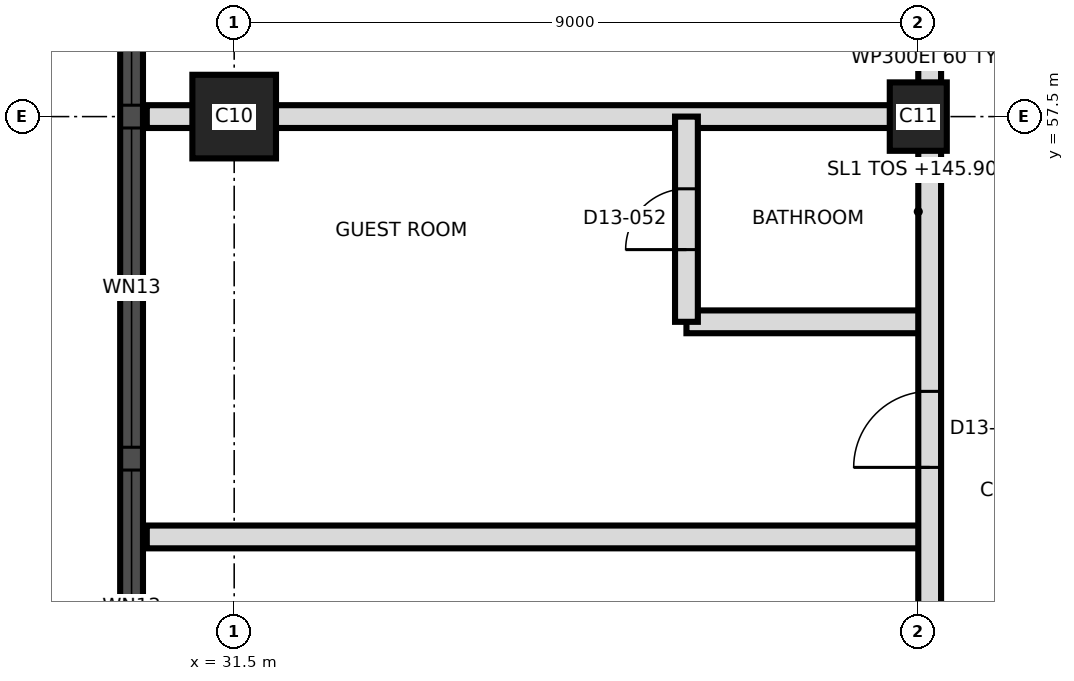
"""IFC4 building model, lengths in metres.
Left out: names, types, materials, properties, quantities, classifications, styles, units other than length and angle.
Written with IfcOpenShell. Run it as: python <this file> out.ifc"""

import sys

from ifc_helpers import new_model, si_unit, direction, frame, frame_2d, origin, origin_2d, place, context, subcontext, project, spatial, rectangle, extrude, element, fill, save


model = new_model("IFC4")
c1 = context("Model", 3, precision=1e-05, world=origin(), true_north=direction((0.0, 1.0)))
c2 = subcontext(c1, "Body", "Model", "MODEL_VIEW")
j1 = project(units=[si_unit("LENGTHUNIT", "METRE"), si_unit("PLANEANGLEUNIT", "RADIAN")], contexts=[c1])
p1 = place(None, origin())
s1 = spatial("IfcSite", under=j1, at=p1, CompositionType="ELEMENT")
p2 = place(p1, origin())
s2 = spatial("IfcBuilding", under=s1, at=p2, CompositionType="ELEMENT")
p3 = place(p2, frame((0.0, 0.0, 145.9)))
s3 = spatial("IfcBuildingStorey", under=s2, at=p3, CompositionType="ELEMENT", Elevation=145.9)
p4 = place(p3, frame((31.5, 57.5, 0.0), z_axis=(0.0, 0.0, 1.0), x_axis=(1.0, 0.0, 0.0)))
e1 = element("IfcColumn", 1, at=p4, inside=s3, PredefinedType="COLUMN", context=c2, shape_type="SweptSolid", body=[
    extrude(rectangle(XDim=1.1, YDim=1.1, at=origin_2d()), origin(), (0.0, 0.0, 1.0), 3.7),
])
p5 = place(p3, frame((40.5, 57.5, 0.0), z_axis=(0.0, 0.0, 1.0), x_axis=(0.0, 1.0, 0.0)))
e2 = element("IfcColumn", 2, at=p5, inside=s3, PredefinedType="COLUMN", context=c2, shape_type="SweptSolid", body=[
    extrude(rectangle(XDim=0.9, YDim=0.75, at=origin_2d()), origin(), (0.0, 0.0, 1.0), 3.7),
])
p6 = place(p3, frame((30.15, 66.992, 0.0), z_axis=(0.0, 0.0, 1.0), x_axis=(0.0, -1.0, 0.0)))
e3 = element("IfcWall", 3, at=p6, inside=s3, PredefinedType="SOLIDWALL", context=c2, shape_type="SweptSolid", body=[
    extrude(rectangle(XDim=32.968, YDim=0.3, at=frame_2d((16.484, 0.0))), origin(), (0.0, 0.0, 1.0), 3.4),
])
p7 = place(p6, frame((1.596, 0.0, 0.3)))
e4 = element("IfcOpeningElement", 4, at=p7, cuts=e3, PredefinedType="OPENING", context=c2, shape_type="SweptSolid", body=[
    extrude(rectangle(XDim=1.8, YDim=2.4, at=frame_2d((0.9, 1.2))), frame((0.0, 0.16, 0.0), z_axis=(0.0, -1.0, 0.0), x_axis=(1.0, 0.0, 0.0)), (0.0, 0.0, 1.0), 0.32),
])
p8 = place(p6, frame((5.142, 0.0, 0.9)))
e5 = element("IfcOpeningElement", 5, at=p8, cuts=e3, PredefinedType="OPENING", context=c2, shape_type="SweptSolid", body=[
    extrude(rectangle(XDim=4.2, YDim=1.7, at=frame_2d((2.1, 0.85))), frame((0.0, 0.16, 0.0), z_axis=(0.0, -1.0, 0.0), x_axis=(1.0, 0.0, 0.0)), (0.0, 0.0, 1.0), 0.32),
])
p9 = place(p6, frame((9.642, 0.0, 0.9)))
e6 = element("IfcOpeningElement", 6, at=p9, cuts=e3, PredefinedType="OPENING", context=c2, shape_type="SweptSolid", body=[
    extrude(rectangle(XDim=4.2, YDim=1.7, at=frame_2d((2.1, 0.85))), frame((0.0, 0.16, 0.0), z_axis=(0.0, -1.0, 0.0), x_axis=(1.0, 0.0, 0.0)), (0.0, 0.0, 1.0), 0.32),
])
p10 = place(p6, frame((14.142, 0.0, 0.9)))
e7 = element("IfcOpeningElement", 7, at=p10, cuts=e3, PredefinedType="OPENING", context=c2, shape_type="SweptSolid", body=[
    extrude(rectangle(XDim=4.2, YDim=1.7, at=frame_2d((2.1, 0.85))), frame((0.0, 0.16, 0.0), z_axis=(0.0, -1.0, 0.0), x_axis=(1.0, 0.0, 0.0)), (0.0, 0.0, 1.0), 0.32),
])
p11 = place(p6, frame((18.642, 0.0, 0.9)))
e8 = element("IfcOpeningElement", 8, at=p11, cuts=e3, PredefinedType="OPENING", context=c2, shape_type="SweptSolid", body=[
    extrude(rectangle(XDim=4.2, YDim=1.7, at=frame_2d((2.1, 0.85))), frame((0.0, 0.16, 0.0), z_axis=(0.0, -1.0, 0.0), x_axis=(1.0, 0.0, 0.0)), (0.0, 0.0, 1.0), 0.32),
])
p12 = place(p6, frame((23.142, 0.0, 0.9)))
e9 = element("IfcOpeningElement", 9, at=p12, cuts=e3, PredefinedType="OPENING", context=c2, shape_type="SweptSolid", body=[
    extrude(rectangle(XDim=4.2, YDim=1.7, at=frame_2d((2.1, 0.85))), frame((0.0, 0.16, 0.0), z_axis=(0.0, -1.0, 0.0), x_axis=(1.0, 0.0, 0.0)), (0.0, 0.0, 1.0), 0.32),
])
p13 = place(p6, frame((29.33, 0.0, 0.3)))
e10 = element("IfcOpeningElement", 10, at=p13, cuts=e3, PredefinedType="OPENING", context=c2, shape_type="SweptSolid", body=[
    extrude(rectangle(XDim=1.8, YDim=2.4, at=frame_2d((0.9, 1.2))), frame((0.0, 0.16, 0.0), z_axis=(0.0, -1.0, 0.0), x_axis=(1.0, 0.0, 0.0)), (0.0, 0.0, 1.0), 0.32),
])
p14 = place(p3, frame((30.35, 51.97, 0.0), z_axis=(0.0, 0.0, 1.0), x_axis=(1.0, 0.0, 0.0)))
e11 = element("IfcWall", 11, at=p14, inside=s3, PredefinedType="PARTITIONING", context=c2, shape_type="SweptSolid", body=[
    extrude(rectangle(XDim=10.3, YDim=0.3, at=frame_2d((5.15, 0.0))), origin(), (0.0, 0.0, 1.0), 3.4),
])
p15 = place(p3, frame((37.45, 54.8, 0.0), z_axis=(0.0, 0.0, 1.0), x_axis=(1.0, 0.0, 0.0)))
e12 = element("IfcWall", 12, at=p15, inside=s3, PredefinedType="PARTITIONING", context=c2, shape_type="SweptSolid", body=[
    extrude(rectangle(XDim=3.2, YDim=0.3, at=frame_2d((1.6, 0.0))), origin(), (0.0, 0.0, 1.0), 3.4),
])
p16 = place(p3, frame((30.35, 57.5, 0.0), z_axis=(0.0, 0.0, 1.0), x_axis=(1.0, 0.0, 0.0)))
e13 = element("IfcWall", 13, at=p16, inside=s3, PredefinedType="PARTITIONING", context=c2, shape_type="SweptSolid", body=[
    extrude(rectangle(XDim=10.3, YDim=0.3, at=frame_2d((5.15, 0.0))), origin(), (0.0, 0.0, 1.0), 3.4),
])
p17 = place(p3, frame((37.45, 54.8, 0.0), z_axis=(0.0, 0.0, 1.0), x_axis=(0.0, 1.0, 0.0)))
e14 = element("IfcWall", 14, at=p17, inside=s3, PredefinedType="PARTITIONING", context=c2, shape_type="SweptSolid", body=[
    extrude(rectangle(XDim=2.7, YDim=0.3, at=frame_2d((1.35, 0.0))), origin(), (0.0, 0.0, 1.0), 3.4),
])
p18 = place(p17, frame((0.95, 0.0, 0.0)))
e15 = element("IfcOpeningElement", 15, at=p18, cuts=e14, PredefinedType="OPENING", context=c2, shape_type="SweptSolid", body=[
    extrude(rectangle(XDim=0.8, YDim=2.1, at=frame_2d((0.4, 1.05))), frame((0.0, 0.16, 0.0), z_axis=(0.0, -1.0, 0.0), x_axis=(1.0, 0.0, 0.0)), (0.0, 0.0, 1.0), 0.32),
])
p19 = place(p3, frame((40.65, 39.65, 0.0), z_axis=(0.0, 0.0, 1.0), x_axis=(0.0, 1.0, 0.0)))
e16 = element("IfcWall", 16, at=p19, inside=s3, PredefinedType="PARTITIONING", context=c2, shape_type="SweptSolid", body=[
    extrude(rectangle(XDim=37.24, YDim=0.3, at=frame_2d((18.62, 0.0))), origin(), (0.0, 0.0, 1.0), 3.4),
])
p20 = place(p19, frame((0.52, 0.0, 0.0)))
e17 = element("IfcOpeningElement", 17, at=p20, cuts=e16, PredefinedType="OPENING", context=c2, shape_type="SweptSolid", body=[
    extrude(rectangle(XDim=1.0, YDim=2.1, at=frame_2d((0.5, 1.05))), frame((0.0, 0.16, 0.0), z_axis=(0.0, -1.0, 0.0), x_axis=(1.0, 0.0, 0.0)), (0.0, 0.0, 1.0), 0.32),
])
p21 = place(p19, frame((6.37, 0.0, 0.0)))
e18 = element("IfcOpeningElement", 18, at=p21, cuts=e16, PredefinedType="OPENING", context=c2, shape_type="SweptSolid", body=[
    extrude(rectangle(XDim=1.0, YDim=2.1, at=frame_2d((0.5, 1.05))), frame((0.0, 0.16, 0.0), z_axis=(0.0, -1.0, 0.0), x_axis=(1.0, 0.0, 0.0)), (0.0, 0.0, 1.0), 0.32),
])
p22 = place(p19, frame((9.985, 0.0, 0.0)))
e19 = element("IfcOpeningElement", 19, at=p22, cuts=e16, PredefinedType="OPENING", context=c2, shape_type="SweptSolid", body=[
    extrude(rectangle(XDim=1.2, YDim=2.1, at=frame_2d((0.6, 1.05))), frame((0.0, 0.16, 0.0), z_axis=(0.0, -1.0, 0.0), x_axis=(1.0, 0.0, 0.0)), (0.0, 0.0, 1.0), 0.32),
])
p23 = place(p19, frame((13.235, 0.0, 0.0)))
e20 = element("IfcOpeningElement", 20, at=p23, cuts=e16, PredefinedType="OPENING", context=c2, shape_type="SweptSolid", body=[
    extrude(rectangle(XDim=1.0, YDim=2.1, at=frame_2d((0.5, 1.05))), frame((0.0, 0.16, 0.0), z_axis=(0.0, -1.0, 0.0), x_axis=(1.0, 0.0, 0.0)), (0.0, 0.0, 1.0), 0.32),
])
p24 = place(p19, frame((21.35, 0.0, 0.0)))
e21 = element("IfcOpeningElement", 21, at=p24, cuts=e16, PredefinedType="OPENING", context=c2, shape_type="SweptSolid", body=[
    extrude(rectangle(XDim=1.0, YDim=2.4, at=frame_2d((0.5, 1.2))), frame((0.0, 0.16, 0.0), z_axis=(0.0, -1.0, 0.0), x_axis=(1.0, 0.0, 0.0)), (0.0, 0.0, 1.0), 0.32),
])
p25 = place(p8, origin())
e22 = element("IfcWindow", 22, at=p25, inside=s3, PartitioningType="SINGLE_PANEL", PredefinedType="WINDOW", context=c2, shape_type="SweptSolid", body=[
    extrude(rectangle(XDim=4.2, YDim=1.7, at=frame_2d((2.1, 0.85))), frame((0.0, 0.03, 0.0), z_axis=(0.0, -1.0, 0.0), x_axis=(1.0, 0.0, 0.0)), (0.0, 0.0, 1.0), 0.06),
])
fill(e5, e22)
p26 = place(p9, origin())
e23 = element("IfcWindow", 23, at=p26, inside=s3, PartitioningType="SINGLE_PANEL", PredefinedType="WINDOW", context=c2, shape_type="SweptSolid", body=[
    extrude(rectangle(XDim=4.2, YDim=1.7, at=frame_2d((2.1, 0.85))), frame((0.0, 0.03, 0.0), z_axis=(0.0, -1.0, 0.0), x_axis=(1.0, 0.0, 0.0)), (0.0, 0.0, 1.0), 0.06),
])
fill(e6, e23)
p27 = place(p10, origin())
e24 = element("IfcWindow", 24, at=p27, inside=s3, PartitioningType="SINGLE_PANEL", PredefinedType="WINDOW", context=c2, shape_type="SweptSolid", body=[
    extrude(rectangle(XDim=4.2, YDim=1.7, at=frame_2d((2.1, 0.85))), frame((0.0, 0.03, 0.0), z_axis=(0.0, -1.0, 0.0), x_axis=(1.0, 0.0, 0.0)), (0.0, 0.0, 1.0), 0.06),
])
fill(e7, e24)
p28 = place(p18, origin())
e25 = element("IfcDoor", 25, at=p28, inside=s3, OperationType="SINGLE_SWING_LEFT", PredefinedType="DOOR", context=c2, shape_type="SweptSolid", body=[
    extrude(rectangle(XDim=0.8, YDim=2.1, at=frame_2d((0.4, 1.05))), frame((0.0, 0.025, 0.0), z_axis=(0.0, -1.0, 0.0), x_axis=(1.0, 0.0, 0.0)), (0.0, 0.0, 1.0), 0.05),
])
fill(e15, e25)
p29 = place(p23, origin())
e26 = element("IfcDoor", 26, at=p29, inside=s3, OperationType="SINGLE_SWING_RIGHT", PredefinedType="DOOR", context=c2, shape_type="SweptSolid", body=[
    extrude(rectangle(XDim=1.0, YDim=2.1, at=frame_2d((0.5, 1.05))), frame((0.0, 0.025, 0.0), z_axis=(0.0, -1.0, 0.0), x_axis=(1.0, 0.0, 0.0)), (0.0, 0.0, 1.0), 0.05),
])
fill(e20, e26)
save(model, sys.argv[1])
